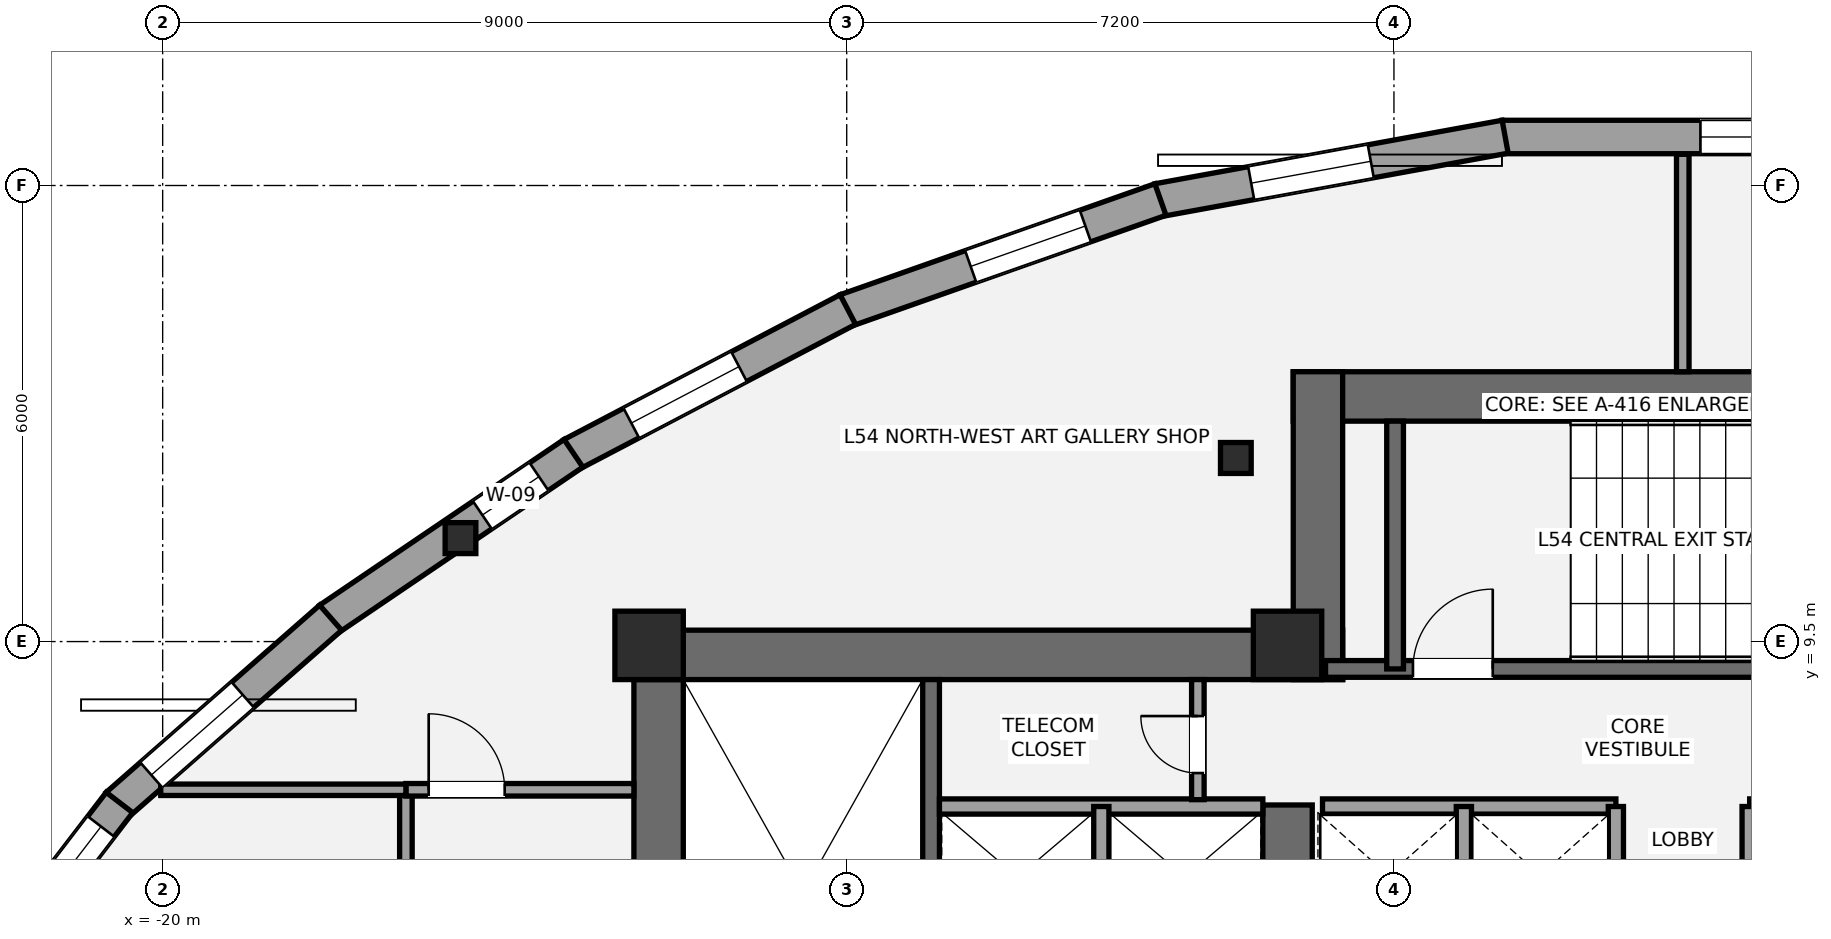
"""IFC4 building model, lengths in metres.
Left out: names, types, materials, properties, quantities, classifications, styles, units other than length and angle.
Written with IfcOpenShell. Run it as: python <this file> out.ifc"""

import sys

from ifc_helpers import new_model, si_unit, direction, frame, frame_2d, origin, origin_2d, place, context, subcontext, project, spatial, rectangle, i_section, extrude, element, fill, save


model = new_model("IFC4")
c1 = context("Model", 3, precision=1e-05, world=origin(), true_north=direction((0.0, 1.0)))
c2 = subcontext(c1, "Body", "Model", "MODEL_VIEW")
j1 = project(units=[si_unit("LENGTHUNIT", "METRE"), si_unit("PLANEANGLEUNIT", "RADIAN")], contexts=[c1])
p1 = place(None, origin())
s1 = spatial("IfcSite", under=j1, at=p1, CompositionType="ELEMENT")
p2 = place(p1, origin())
s2 = spatial("IfcBuilding", under=s1, at=p2, CompositionType="ELEMENT")
p3 = place(p2, frame((0.0, 0.0, 195.0)))
s3 = spatial("IfcBuildingStorey", under=s2, at=p3, CompositionType="ELEMENT", Elevation=195.0)
p4 = place(p3, frame((-13.475, 1.2, 0.0), z_axis=(0.0, 0.0, 1.0), x_axis=(0.0, 1.0, 0.0)))
e1 = element("IfcWall", 1, at=p4, inside=s3, PredefinedType="SHEAR", context=c2, shape_type="SweptSolid", body=[
    extrude(rectangle(XDim=8.45, YDim=0.65, at=frame_2d((4.225, 0.0))), origin(), (0.0, 0.0, 1.0), 3.2),
])
p5 = place(p3, frame((-13.8, 9.325, 0.0), z_axis=(0.0, 0.0, 1.0), x_axis=(1.0, 0.0, 0.0)))
e2 = element("IfcWall", 2, at=p5, inside=s3, PredefinedType="SHEAR", context=c2, shape_type="SweptSolid", body=[
    extrude(rectangle(XDim=9.325, YDim=0.65, at=frame_2d((4.663, 0.0))), origin(), (0.0, 0.0, 1.0), 3.2),
])
p6 = place(p3, frame((-5.2, 5.35, 0.0), z_axis=(0.0, 0.0, 1.0), x_axis=(0.0, 1.0, 0.0)))
e3 = element("IfcWall", 3, at=p6, inside=s3, PredefinedType="SHEAR", context=c2, shape_type="SweptSolid", body=[
    extrude(rectangle(XDim=2.0, YDim=0.65, at=frame_2d((1.0, 0.0))), origin(), (0.0, 0.0, 1.0), 3.2),
])
p7 = place(p3, frame((-9.89, 1.85, 0.0), z_axis=(0.0, 0.0, 1.0), x_axis=(0.0, 1.0, 0.0)))
e4 = element("IfcWall", 4, at=p7, inside=s3, PredefinedType="SHEAR", context=c2, shape_type="SweptSolid", body=[
    extrude(rectangle(XDim=7.15, YDim=0.22, at=frame_2d((3.575, 0.0))), origin(), (0.0, 0.0, 1.0), 3.2),
])
p8 = place(p3, frame((-5.125, 12.725, 0.0), z_axis=(0.0, 0.0, 1.0), x_axis=(1.0, 0.0, 0.0)))
e5 = element("IfcWall", 5, at=p8, inside=s3, PredefinedType="SHEAR", context=c2, shape_type="SweptSolid", body=[
    extrude(rectangle(XDim=10.25, YDim=0.65, at=frame_2d((5.125, 0.0))), origin(), (0.0, 0.0, 1.0), 3.2),
])
p9 = place(p3, frame((-4.8, 9.0, 0.0), z_axis=(0.0, 0.0, 1.0), x_axis=(0.0, 1.0, 0.0)))
e6 = element("IfcWall", 6, at=p9, inside=s3, PredefinedType="SHEAR", context=c2, shape_type="SweptSolid", body=[
    extrude(rectangle(XDim=4.05, YDim=0.65, at=frame_2d((2.025, 0.0))), origin(), (0.0, 0.0, 1.0), 3.2),
])
p10 = place(p3, frame((-4.7, 9.14, 0.0), z_axis=(0.0, 0.0, 1.0), x_axis=(1.0, 0.0, 0.0)))
e7 = element("IfcWall", 7, at=p10, inside=s3, PredefinedType="SHEAR", context=c2, shape_type="SweptSolid", body=[
    extrude(rectangle(XDim=9.3, YDim=0.22, at=frame_2d((4.65, 0.0))), origin(), (0.0, 0.0, 1.0), 3.2),
])
p11 = place(p10, frame((1.15, 0.0, 0.0)))
e8 = element("IfcOpeningElement", 8, at=p11, cuts=e7, PredefinedType="OPENING", context=c2, shape_type="SweptSolid", body=[
    extrude(rectangle(XDim=1.05, YDim=2.15, at=frame_2d((0.525, 1.075))), frame((0.0, 0.12, 0.0), z_axis=(0.0, -1.0, 0.0), x_axis=(1.0, 0.0, 0.0)), (0.0, 0.0, 1.0), 0.24),
])
p12 = place(p3, frame((-3.785, 9.14, 0.0), z_axis=(0.0, 0.0, 1.0), x_axis=(0.0, 1.0, 0.0)))
e9 = element("IfcWall", 9, at=p12, inside=s3, PredefinedType="SHEAR", context=c2, shape_type="SweptSolid", body=[
    extrude(rectangle(XDim=3.26, YDim=0.22, at=frame_2d((1.63, 0.0))), origin(), (0.0, 0.0, 1.0), 3.2),
])
for number, where, z_axis, x_axis in (
    (10, (-13.6, 9.45, 0.0), (0.0, 0.0, 1.0), (1.0, 0.0, 0.0)),
    (11, (-5.2, 9.45, 0.0), (0.0, 0.0, 1.0), (1.0, 0.0, 0.0)),
):
    element("IfcColumn", number, at=place(p3, frame(where, z_axis=z_axis, x_axis=x_axis)), inside=s3, PredefinedType="COLUMN", context=c2, shape_type="SweptSolid", body=[
        extrude(rectangle(XDim=0.9, YDim=0.9, at=origin_2d()), origin(), (0.0, 0.0, 1.0), 3.2),
    ])
for number, where, z_axis, x_axis in (
    (12, (-5.88, 11.915, 0.0), (0.0, 0.0, 1.0), (1.0, 0.0, 0.0)),
    (13, (-16.082, 10.861, 0.0), (0.0, 0.0, 1.0), (1.0, 0.0, 0.0)),
):
    element("IfcColumn", number, at=place(p3, frame(where, z_axis=z_axis, x_axis=x_axis)), inside=s3, PredefinedType="COLUMN", context=c2, shape_type="SweptSolid", body=[
        extrude(i_section(OverallWidth=0.404, OverallDepth=0.407, WebThickness=0.027, FlangeThickness=0.044, at=origin_2d()), origin(), (0.0, 0.0, 1.0), 3.2),
    ])
p13 = place(p3, frame((-2.376, 16.138, 0.0), z_axis=(0.0, 0.0, 1.0), x_axis=(1.0, 0.0, 0.0)))
e14 = element("IfcWall", 14, at=p13, inside=s3, PredefinedType="STANDARD", context=c2, shape_type="SweptSolid", body=[
    extrude(rectangle(XDim=4.753, YDim=0.44, at=frame_2d((2.376, 0.0))), origin(), (0.0, 0.0, 1.0), 2.315),
])
p14 = place(p13, frame((2.609, 0.0, 0.58)))
e15 = element("IfcOpeningElement", 15, at=p14, cuts=e14, PredefinedType="OPENING", context=c2, shape_type="SweptSolid", body=[
    extrude(rectangle(XDim=1.6, YDim=1.55, at=frame_2d((0.8, 0.775))), frame((0.0, 0.23, 0.0), z_axis=(0.0, -1.0, 0.0), x_axis=(1.0, 0.0, 0.0)), (0.0, 0.0, 1.0), 0.46),
])
p15 = place(p3, frame((-6.906, 15.306, 0.0), z_axis=(0.0, 0.0, 1.0), x_axis=(0.983691132349, 0.179865939348, 0.0)))
e16 = element("IfcWall", 16, at=p15, inside=s3, PredefinedType="STANDARD", context=c2, shape_type="SweptSolid", body=[
    extrude(rectangle(XDim=4.645, YDim=0.44, at=frame_2d((2.322, 0.0))), origin(), (0.0, 0.0, 1.0), 2.315),
])
p16 = place(p15, frame((1.248, 0.0, 0.58)))
e17 = element("IfcOpeningElement", 17, at=p16, cuts=e16, PredefinedType="OPENING", context=c2, shape_type="SweptSolid", body=[
    extrude(rectangle(XDim=1.6, YDim=1.55, at=frame_2d((0.8, 0.775))), frame((0.0, 0.23, 0.0), z_axis=(0.0, -1.0, 0.0), x_axis=(1.0, 0.0, 0.0)), (0.0, 0.0, 1.0), 0.46),
])
p17 = place(p3, frame((-11.014, 13.855, 0.0), z_axis=(0.0, 0.0, 1.0), x_axis=(0.943100102185, 0.332508943125, 0.0)))
e18 = element("IfcWall", 18, at=p17, inside=s3, PredefinedType="STANDARD", context=c2, shape_type="SweptSolid", body=[
    extrude(rectangle(XDim=4.391, YDim=0.44, at=frame_2d((2.196, 0.0))), origin(), (0.0, 0.0, 1.0), 2.315),
])
p18 = place(p17, frame((1.744, 0.0, 0.58)))
e19 = element("IfcOpeningElement", 19, at=p18, cuts=e18, PredefinedType="OPENING", context=c2, shape_type="SweptSolid", body=[
    extrude(rectangle(XDim=1.6, YDim=1.55, at=frame_2d((0.8, 0.775))), frame((0.0, 0.23, 0.0), z_axis=(0.0, -1.0, 0.0), x_axis=(1.0, 0.0, 0.0)), (0.0, 0.0, 1.0), 0.46),
])
p19 = place(p3, frame((-14.617, 11.964, 0.0), z_axis=(0.0, 0.0, 1.0), x_axis=(0.885676487837, 0.464302874094, 0.0)))
e20 = element("IfcWall", 20, at=p19, inside=s3, PredefinedType="STANDARD", context=c2, shape_type="SweptSolid", body=[
    extrude(rectangle(XDim=4.1, YDim=0.44, at=frame_2d((2.05, 0.0))), origin(), (0.0, 0.0, 1.0), 2.315),
])
p20 = place(p19, frame((0.884, 0.0, 0.58)))
e21 = element("IfcOpeningElement", 21, at=p20, cuts=e20, PredefinedType="OPENING", context=c2, shape_type="SweptSolid", body=[
    extrude(rectangle(XDim=1.6, YDim=1.55, at=frame_2d((0.8, 0.775))), frame((0.0, 0.23, 0.0), z_axis=(0.0, -1.0, 0.0), x_axis=(1.0, 0.0, 0.0)), (0.0, 0.0, 1.0), 0.46),
])
p21 = place(p3, frame((-17.811, 9.797, 0.0), z_axis=(0.0, 0.0, 1.0), x_axis=(0.827704046296, 0.561164870377, 0.0)))
e22 = element("IfcWall", 22, at=p21, inside=s3, PredefinedType="STANDARD", context=c2, shape_type="SweptSolid", body=[
    extrude(rectangle(XDim=3.885, YDim=0.44, at=frame_2d((1.943, 0.0))), origin(), (0.0, 0.0, 1.0), 2.315),
])
p22 = place(p21, frame((2.438, 0.0, 0.58)))
e23 = element("IfcOpeningElement", 23, at=p22, cuts=e22, PredefinedType="OPENING", context=c2, shape_type="SweptSolid", body=[
    extrude(rectangle(XDim=0.9, YDim=1.35, at=frame_2d((0.45, 0.675))), frame((0.0, 0.23, 0.0), z_axis=(0.0, -1.0, 0.0), x_axis=(1.0, 0.0, 0.0)), (0.0, 0.0, 1.0), 0.46),
])
p23 = place(p3, frame((-20.598, 7.351, 0.0), z_axis=(0.0, 0.0, 1.0), x_axis=(0.751936480142, 0.65923556475, 0.0)))
e24 = element("IfcWall", 24, at=p23, inside=s3, PredefinedType="STANDARD", context=c2, shape_type="SweptSolid", body=[
    extrude(rectangle(XDim=3.735, YDim=0.44, at=frame_2d((1.867, 0.0))), origin(), (0.0, 0.0, 1.0), 2.315),
])
p24 = place(p23, frame((0.596, 0.0, 0.58)))
e25 = element("IfcOpeningElement", 25, at=p24, cuts=e24, PredefinedType="OPENING", context=c2, shape_type="SweptSolid", body=[
    extrude(rectangle(XDim=1.6, YDim=1.55, at=frame_2d((0.8, 0.775))), frame((0.0, 0.23, 0.0), z_axis=(0.0, -1.0, 0.0), x_axis=(1.0, 0.0, 0.0)), (0.0, 0.0, 1.0), 0.46),
])
p25 = place(p3, frame((-22.722, 4.575, 0.0), z_axis=(0.0, 0.0, 1.0), x_axis=(0.608586512644, 0.793487527708, 0.0)))
e26 = element("IfcWall", 26, at=p25, inside=s3, PredefinedType="STANDARD", context=c2, shape_type="SweptSolid", body=[
    extrude(rectangle(XDim=3.539, YDim=0.44, at=frame_2d((1.769, 0.0))), origin(), (0.0, 0.0, 1.0), 2.315),
])
p26 = place(p25, frame((1.54, 0.0, 0.58)))
e27 = element("IfcOpeningElement", 27, at=p26, cuts=e26, PredefinedType="OPENING", context=c2, shape_type="SweptSolid", body=[
    extrude(rectangle(XDim=1.6, YDim=1.55, at=frame_2d((0.8, 0.775))), frame((0.0, 0.23, 0.0), z_axis=(0.0, -1.0, 0.0), x_axis=(1.0, 0.0, 0.0)), (0.0, 0.0, 1.0), 0.46),
])
p27 = place(p3, frame((-9.78, 7.33, 0.0), z_axis=(0.0, 0.0, 1.0), x_axis=(1.0, 0.0, 0.0)))
e28 = element("IfcWall", 28, at=p27, inside=s3, PredefinedType="SOLIDWALL", context=c2, shape_type="SweptSolid", body=[
    extrude(rectangle(XDim=4.255, YDim=0.2, at=frame_2d((2.127, 0.0))), origin(), (0.0, 0.0, 1.0), 3.02),
])
p28 = place(p3, frame((-7.65, 5.47, 0.0), z_axis=(0.0, 0.0, 1.0), x_axis=(0.0, 1.0, 0.0)))
e29 = element("IfcWall", 29, at=p28, inside=s3, PredefinedType="SOLIDWALL", context=c2, shape_type="SweptSolid", body=[
    extrude(rectangle(XDim=1.86, YDim=0.2, at=frame_2d((0.93, 0.0))), origin(), (0.0, 0.0, 1.0), 3.02),
])
for number, where, z_axis, x_axis in (
    (30, (-4.74, 7.33, 0.0), (0.0, 0.0, 1.0), (1.0, 0.0, 0.0)),
    (31, (0.88, 7.33, 0.0), (0.0, 0.0, 1.0), (1.0, 0.0, 0.0)),
):
    element("IfcWall", number, at=place(p3, frame(where, z_axis=z_axis, x_axis=x_axis)), inside=s3, PredefinedType="SOLIDWALL", context=c2, shape_type="SweptSolid", body=[
        extrude(rectangle(XDim=3.86, YDim=0.2, at=frame_2d((1.93, 0.0))), origin(), (0.0, 0.0, 1.0), 3.02),
    ])
for number, where, z_axis, x_axis in (
    (32, (-2.88, 5.52, 0.0), (0.0, 0.0, 1.0), (0.0, 1.0, 0.0)),
    (33, (-0.88, 5.52, 0.0), (0.0, 0.0, 1.0), (0.0, 1.0, 0.0)),
    (34, (0.88, 5.52, 0.0), (0.0, 0.0, 1.0), (0.0, 1.0, 0.0)),
):
    element("IfcWall", number, at=place(p3, frame(where, z_axis=z_axis, x_axis=x_axis)), inside=s3, PredefinedType="SOLIDWALL", context=c2, shape_type="SweptSolid", body=[
        extrude(rectangle(XDim=1.81, YDim=0.2, at=frame_2d((0.905, 0.0))), origin(), (0.0, 0.0, 1.0), 3.02),
    ])
p29 = place(p3, frame((-6.38, 7.42, 0.0), z_axis=(0.0, 0.0, 1.0), x_axis=(0.0, 1.0, 0.0)))
e35 = element("IfcWall", 35, at=p29, inside=s3, PredefinedType="PARTITIONING", context=c2, shape_type="SweptSolid", body=[
    extrude(rectangle(XDim=1.58, YDim=0.165, at=frame_2d((0.79, 0.0))), origin(), (0.0, 0.0, 1.0), 3.02),
])
p30 = place(p29, frame((0.35, 0.0, 0.0)))
e36 = element("IfcOpeningElement", 36, at=p30, cuts=e35, PredefinedType="OPENING", context=c2, shape_type="SweptSolid", body=[
    extrude(rectangle(XDim=0.75, YDim=2.1, at=frame_2d((0.375, 1.05))), frame((0.0, 0.093, 0.0), z_axis=(0.0, -1.0, 0.0), x_axis=(1.0, 0.0, 0.0)), (0.0, 0.0, 1.0), 0.185),
])
p31 = place(p3, frame((-16.8, -6.15, 0.0), z_axis=(0.0, 0.0, 1.0), x_axis=(0.0, 1.0, 0.0)))
e37 = element("IfcWall", 37, at=p31, inside=s3, PredefinedType="PARTITIONING", context=c2, shape_type="SweptSolid", body=[
    extrude(rectangle(XDim=13.7, YDim=0.165, at=frame_2d((6.85, 0.0))), origin(), (0.0, 0.0, 1.0), 2.398),
])
p32 = place(p31, frame((2.65, 0.0, 0.0)))
e38 = element("IfcOpeningElement", 38, at=p32, cuts=e37, PredefinedType="OPENING", context=c2, shape_type="SweptSolid", body=[
    extrude(rectangle(XDim=1.0, YDim=2.15, at=frame_2d((0.5, 1.075))), frame((0.0, 0.093, 0.0), z_axis=(0.0, -1.0, 0.0), x_axis=(1.0, 0.0, 0.0)), (0.0, 0.0, 1.0), 0.185),
])
p33 = place(p31, frame((10.225, 0.0, 0.0)))
e39 = element("IfcOpeningElement", 39, at=p33, cuts=e37, PredefinedType="OPENING", context=c2, shape_type="SweptSolid", body=[
    extrude(rectangle(XDim=1.0, YDim=2.15, at=frame_2d((0.5, 1.075))), frame((0.0, 0.093, 0.0), z_axis=(0.0, -1.0, 0.0), x_axis=(1.0, 0.0, 0.0)), (0.0, 0.0, 1.0), 0.185),
])
p34 = place(p3, frame((-16.8, 7.55, 0.0), z_axis=(0.0, 0.0, 1.0), x_axis=(1.0, 0.0, 0.0)))
e40 = element("IfcWall", 40, at=p34, inside=s3, PredefinedType="PARTITIONING", context=c2, shape_type="SweptSolid", body=[
    extrude(rectangle(XDim=3.0, YDim=0.165, at=frame_2d((1.5, 0.0))), origin(), (0.0, 0.0, 1.0), 2.473),
])
p35 = place(p34, frame((0.3, 0.0, 0.0)))
e41 = element("IfcOpeningElement", 41, at=p35, cuts=e40, PredefinedType="OPENING", context=c2, shape_type="SweptSolid", body=[
    extrude(rectangle(XDim=1.0, YDim=2.15, at=frame_2d((0.5, 1.075))), frame((0.0, 0.093, 0.0), z_axis=(0.0, -1.0, 0.0), x_axis=(1.0, 0.0, 0.0)), (0.0, 0.0, 1.0), 0.185),
])
p36 = place(p3, frame((-20.025, 7.55, 0.0), z_axis=(0.0, 0.0, 1.0), x_axis=(1.0, 0.0, 0.0)))
e42 = element("IfcWall", 42, at=p36, inside=s3, PredefinedType="PLUMBINGWALL", context=c2, shape_type="SweptSolid", body=[
    extrude(rectangle(XDim=3.225, YDim=0.15, at=frame_2d((1.613, 0.0))), origin(), (0.0, 0.0, 1.0), 2.473),
])
p37 = place(p3, frame((0.0, 13.05, 0.0), z_axis=(0.0, 0.0, 1.0), x_axis=(0.0, 1.0, 0.0)))
e43 = element("IfcWall", 43, at=p37, inside=s3, PredefinedType="PARTITIONING", context=c2, shape_type="SweptSolid", body=[
    extrude(rectangle(XDim=2.86, YDim=0.165, at=frame_2d((1.43, 0.0))), origin(), (0.0, 0.0, 1.0), 3.02),
])
p38 = place(p14, origin())
e44 = element("IfcWindow", 44, at=p38, inside=s3, PartitioningType="SINGLE_PANEL", PredefinedType="WINDOW", context=c2, shape_type="SweptSolid", body=[
    extrude(rectangle(XDim=1.6, YDim=1.55, at=frame_2d((0.8, 0.775))), frame((0.0, -0.01, 0.0), z_axis=(0.0, -1.0, 0.0), x_axis=(1.0, 0.0, 0.0)), (0.0, 0.0, 1.0), 0.06),
])
fill(e15, e44)
p39 = place(p16, origin())
e45 = element("IfcWindow", 45, at=p39, inside=s3, PartitioningType="SINGLE_PANEL", PredefinedType="WINDOW", context=c2, shape_type="SweptSolid", body=[
    extrude(rectangle(XDim=1.6, YDim=1.55, at=frame_2d((0.8, 0.775))), frame((0.0, -0.01, 0.0), z_axis=(0.0, -1.0, 0.0), x_axis=(1.0, 0.0, 0.0)), (0.0, 0.0, 1.0), 0.06),
])
fill(e17, e45)
p40 = place(p18, origin())
e46 = element("IfcWindow", 46, at=p40, inside=s3, PartitioningType="SINGLE_PANEL", PredefinedType="WINDOW", context=c2, shape_type="SweptSolid", body=[
    extrude(rectangle(XDim=1.6, YDim=1.55, at=frame_2d((0.8, 0.775))), frame((0.0, -0.01, 0.0), z_axis=(0.0, -1.0, 0.0), x_axis=(1.0, 0.0, 0.0)), (0.0, 0.0, 1.0), 0.06),
])
fill(e19, e46)
p41 = place(p20, origin())
e47 = element("IfcWindow", 47, at=p41, inside=s3, PartitioningType="SINGLE_PANEL", PredefinedType="WINDOW", context=c2, shape_type="SweptSolid", body=[
    extrude(rectangle(XDim=1.6, YDim=1.55, at=frame_2d((0.8, 0.775))), frame((0.0, -0.01, 0.0), z_axis=(0.0, -1.0, 0.0), x_axis=(1.0, 0.0, 0.0)), (0.0, 0.0, 1.0), 0.06),
])
fill(e21, e47)
p42 = place(p22, origin())
e48 = element("IfcWindow", 48, at=p42, inside=s3, PartitioningType="SINGLE_PANEL", PredefinedType="WINDOW", context=c2, shape_type="SweptSolid", body=[
    extrude(rectangle(XDim=0.9, YDim=1.35, at=frame_2d((0.45, 0.675))), frame((0.0, -0.01, 0.0), z_axis=(0.0, -1.0, 0.0), x_axis=(1.0, 0.0, 0.0)), (0.0, 0.0, 1.0), 0.06),
])
fill(e23, e48)
p43 = place(p24, origin())
e49 = element("IfcWindow", 49, at=p43, inside=s3, PartitioningType="SINGLE_PANEL", PredefinedType="WINDOW", context=c2, shape_type="SweptSolid", body=[
    extrude(rectangle(XDim=1.6, YDim=1.55, at=frame_2d((0.8, 0.775))), frame((0.0, -0.01, 0.0), z_axis=(0.0, -1.0, 0.0), x_axis=(1.0, 0.0, 0.0)), (0.0, 0.0, 1.0), 0.06),
])
fill(e25, e49)
p44 = place(p26, origin())
e50 = element("IfcWindow", 50, at=p44, inside=s3, PartitioningType="SINGLE_PANEL", PredefinedType="WINDOW", context=c2, shape_type="SweptSolid", body=[
    extrude(rectangle(XDim=1.6, YDim=1.55, at=frame_2d((0.8, 0.775))), frame((0.0, -0.01, 0.0), z_axis=(0.0, -1.0, 0.0), x_axis=(1.0, 0.0, 0.0)), (0.0, 0.0, 1.0), 0.06),
])
fill(e27, e50)
p45 = place(p11, origin())
e51 = element("IfcDoor", 51, at=p45, inside=s3, OperationType="SINGLE_SWING_RIGHT", PredefinedType="DOOR", context=c2, shape_type="SweptSolid", body=[
    extrude(rectangle(XDim=1.05, YDim=2.15, at=frame_2d((0.525, 1.075))), frame((0.0, 0.025, 0.0), z_axis=(0.0, -1.0, 0.0), x_axis=(1.0, 0.0, 0.0)), (0.0, 0.0, 1.0), 0.05),
])
fill(e8, e51)
p46 = place(p30, origin())
e52 = element("IfcDoor", 52, at=p46, inside=s3, OperationType="SINGLE_SWING_RIGHT", PredefinedType="DOOR", context=c2, shape_type="SweptSolid", body=[
    extrude(rectangle(XDim=0.75, YDim=2.1, at=frame_2d((0.375, 1.05))), frame((0.0, 0.025, 0.0), z_axis=(0.0, -1.0, 0.0), x_axis=(1.0, 0.0, 0.0)), (0.0, 0.0, 1.0), 0.05),
])
fill(e36, e52)
p47 = place(p35, origin())
e53 = element("IfcDoor", 53, at=p47, inside=s3, OperationType="SINGLE_SWING_LEFT", PredefinedType="DOOR", context=c2, shape_type="SweptSolid", body=[
    extrude(rectangle(XDim=1.0, YDim=2.15, at=frame_2d((0.5, 1.075))), frame((0.0, 0.025, 0.0), z_axis=(0.0, -1.0, 0.0), x_axis=(1.0, 0.0, 0.0)), (0.0, 0.0, 1.0), 0.05),
])
fill(e41, e53)
save(model, sys.argv[1])
